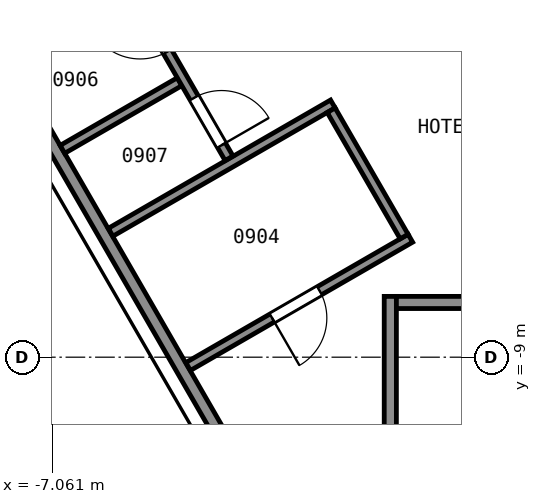
"""IFC4 building model, lengths in metres.
Left out: names, types, materials, properties, quantities, classifications, styles, units other than length and angle.
Written with IfcOpenShell. Run it as: python <this file> out.ifc"""

import sys

from ifc_helpers import new_model, si_unit, direction, frame, frame_2d, origin, place, context, subcontext, project, spatial, rectangle, extrude, element, fill, save


model = new_model("IFC4")
c1 = context("Model", 3, precision=1e-05, world=origin(), true_north=direction((0.0, 1.0)))
c2 = subcontext(c1, "Body", "Model", "MODEL_VIEW")
j1 = project(units=[si_unit("LENGTHUNIT", "METRE"), si_unit("PLANEANGLEUNIT", "RADIAN")], contexts=[c1])
p1 = place(None, origin())
s1 = spatial("IfcSite", under=j1, at=p1, CompositionType="ELEMENT")
p2 = place(p1, origin())
s2 = spatial("IfcBuilding", under=s1, at=p2, CompositionType="ELEMENT")
p3 = place(p2, frame((0.0, 0.0, 47.6)))
s3 = spatial("IfcBuildingStorey", under=s2, at=p3, CompositionType="ELEMENT", Elevation=47.6)
p4 = place(p3, frame((-1.5, -8.0, 0.0), z_axis=(0.0, 0.0, 1.0), x_axis=(0.0, -1.0, 0.0)))
e1 = element("IfcWall", 1, at=p4, inside=s3, PredefinedType="PARTITIONING", context=c2, shape_type="SweptSolid", body=[
    extrude(rectangle(XDim=12.0, YDim=0.2, at=frame_2d((6.0, 0.0))), origin(), (0.0, 0.0, 1.0), 3.35),
])
p5 = place(p3, frame((-1.4, -8.1, 0.0), z_axis=(0.0, 0.0, 1.0), x_axis=(1.0, 0.0, 0.0)))
e2 = element("IfcWall", 2, at=p5, inside=s3, PredefinedType="PARTITIONING", context=c2, shape_type="SweptSolid", body=[
    extrude(rectangle(XDim=2.8, YDim=0.2, at=frame_2d((1.4, 0.0))), origin(), (0.0, 0.0, 1.0), 3.35),
])
p6 = place(p3, frame((-13.664, 5.946, 0.0), z_axis=(0.0, 0.0, 1.0), x_axis=(0.499994327219, -0.866028678941, 0.0)))
e3 = element("IfcWall", 3, at=p6, inside=s3, PredefinedType="PARTITIONING", context=c2, shape_type="SweptSolid", body=[
    extrude(rectangle(XDim=23.968, YDim=0.2, at=frame_2d((11.984, 0.0))), origin(), (0.0, 0.0, 1.0), 3.35),
])
p7 = place(p3, frame((-7.856, -3.912, 0.0), z_axis=(0.0, 0.0, 1.0), x_axis=(0.865971748, 0.500092923031, 0.0)))
e4 = element("IfcWall", 4, at=p7, inside=s3, PredefinedType="PARTITIONING", context=c2, shape_type="SweptSolid", body=[
    extrude(rectangle(XDim=2.225, YDim=0.15, at=frame_2d((1.112, 0.0))), origin(), (0.0, 0.0, 1.0), 3.35),
])
p8 = place(p3, frame((-6.892, -5.582, 0.0), z_axis=(0.0, 0.0, 1.0), x_axis=(0.865944298464, 0.500140452231, 0.0)))
e5 = element("IfcWall", 5, at=p8, inside=s3, PredefinedType="PARTITIONING", context=c2, shape_type="SweptSolid", body=[
    extrude(rectangle(XDim=2.224, YDim=0.15, at=frame_2d((1.112, 0.0))), origin(), (0.0, 0.0, 1.0), 3.35),
])
p9 = place(p3, frame((-6.1, -6.946, 0.0), z_axis=(0.0, 0.0, 1.0), x_axis=(0.866038200431, 0.499977834903, 0.0)))
e6 = element("IfcWall", 6, at=p9, inside=s3, PredefinedType="PARTITIONING", context=c2, shape_type="SweptSolid", body=[
    extrude(rectangle(XDim=4.22, YDim=0.15, at=frame_2d((2.11, 0.0))), origin(), (0.0, 0.0, 1.0), 3.35),
])
p10 = place(p3, frame((-4.152, -5.729, 0.0), z_axis=(0.0, 0.0, 1.0), x_axis=(-0.500024287448, 0.866011380966, 0.0)))
e7 = element("IfcWall", 7, at=p10, inside=s3, PredefinedType="PARTITIONING", context=c2, shape_type="SweptSolid", body=[
    extrude(rectangle(XDim=3.501, YDim=0.15, at=frame_2d((1.75, 0.0))), origin(), (0.0, 0.0, 1.0), 3.35),
])
p11 = place(p10, frame((2.026, 0.0, 0.0)))
e8 = element("IfcOpeningElement", 8, at=p11, cuts=e7, PredefinedType="OPENING", context=c2, shape_type="SweptSolid", body=[
    extrude(rectangle(XDim=0.9, YDim=2.1, at=frame_2d((0.45, 1.05))), frame((0.0, 0.085, 0.0), z_axis=(0.0, -1.0, 0.0), x_axis=(1.0, 0.0, 0.0)), (0.0, 0.0, 1.0), 0.17),
])
p12 = place(p10, frame((0.248, 0.0, 0.0)))
e9 = element("IfcOpeningElement", 9, at=p12, cuts=e7, PredefinedType="OPENING", context=c2, shape_type="SweptSolid", body=[
    extrude(rectangle(XDim=0.9, YDim=2.1, at=frame_2d((0.45, 1.05))), frame((0.0, 0.085, 0.0), z_axis=(0.0, -1.0, 0.0), x_axis=(1.0, 0.0, 0.0)), (0.0, 0.0, 1.0), 0.17),
])
p13 = place(p3, frame((-4.825, -9.154, 0.0), z_axis=(0.0, 0.0, 1.0), x_axis=(0.866023738697, 0.500002884005, 0.0)))
e10 = element("IfcWall", 10, at=p13, inside=s3, PredefinedType="PARTITIONING", context=c2, shape_type="SweptSolid", body=[
    extrude(rectangle(XDim=4.22, YDim=0.15, at=frame_2d((2.11, 0.0))), origin(), (0.0, 0.0, 1.0), 3.35),
])
p14 = place(p13, frame((1.595, 0.0, 0.0)))
e11 = element("IfcOpeningElement", 11, at=p14, cuts=e10, PredefinedType="OPENING", context=c2, shape_type="SweptSolid", body=[
    extrude(rectangle(XDim=0.9, YDim=2.1, at=frame_2d((0.45, 1.05))), frame((0.0, 0.085, 0.0), z_axis=(0.0, -1.0, 0.0), x_axis=(1.0, 0.0, 0.0)), (0.0, 0.0, 1.0), 0.17),
])
p15 = place(p3, frame((-2.472, -4.938, 0.0), z_axis=(0.0, 0.0, 1.0), x_axis=(0.500045362686, -0.865999212041, 0.0)))
e12 = element("IfcWall", 12, at=p15, inside=s3, PredefinedType="PARTITIONING", context=c2, shape_type="SweptSolid", body=[
    extrude(rectangle(XDim=2.4, YDim=0.15, at=frame_2d((1.2, 0.0))), origin(), (0.0, 0.0, 1.0), 3.35),
])
p16 = place(p3, frame((-3.766, -17.959, 0.0), z_axis=(0.0, 0.0, 1.0), x_axis=(-0.500002884005, 0.866023738697, 0.0)))
e13 = element("IfcWall", 13, at=p16, inside=s3, PredefinedType="PARTITIONING", context=c2, shape_type="SweptSolid", body=[
    extrude(rectangle(XDim=28.135, YDim=0.125, at=frame_2d((14.067, 0.0))), origin(), (0.0, 0.0, 1.0), 2.613),
])
p17 = place(p16, frame((25.422, 0.0, 0.0)))
e14 = element("IfcOpeningElement", 14, at=p17, cuts=e13, PredefinedType="OPENING", context=c2, shape_type="SweptSolid", body=[
    extrude(rectangle(XDim=1.0, YDim=2.1, at=frame_2d((0.5, 1.05))), frame((0.0, 0.073, 0.0), z_axis=(0.0, -1.0, 0.0), x_axis=(1.0, 0.0, 0.0)), (0.0, 0.0, 1.0), 0.145),
])
p18 = place(p16, frame((21.693, 0.0, 0.0)))
e15 = element("IfcOpeningElement", 15, at=p18, cuts=e13, PredefinedType="OPENING", context=c2, shape_type="SweptSolid", body=[
    extrude(rectangle(XDim=0.9, YDim=2.1, at=frame_2d((0.45, 1.05))), frame((0.0, 0.073, 0.0), z_axis=(0.0, -1.0, 0.0), x_axis=(1.0, 0.0, 0.0)), (0.0, 0.0, 1.0), 0.145),
])
p19 = place(p16, frame((14.438, 0.0, 0.0)))
e16 = element("IfcOpeningElement", 16, at=p19, cuts=e13, PredefinedType="OPENING", context=c2, shape_type="SweptSolid", body=[
    extrude(rectangle(XDim=0.9, YDim=2.1, at=frame_2d((0.45, 1.05))), frame((0.0, 0.073, 0.0), z_axis=(0.0, -1.0, 0.0), x_axis=(1.0, 0.0, 0.0)), (0.0, 0.0, 1.0), 0.145),
])
p20 = place(p16, frame((11.712, 0.0, 0.0)))
e17 = element("IfcOpeningElement", 17, at=p20, cuts=e13, PredefinedType="OPENING", context=c2, shape_type="SweptSolid", body=[
    extrude(rectangle(XDim=0.9, YDim=2.1, at=frame_2d((0.45, 1.05))), frame((0.0, 0.073, 0.0), z_axis=(0.0, -1.0, 0.0), x_axis=(1.0, 0.0, 0.0)), (0.0, 0.0, 1.0), 0.145),
])
p21 = place(p16, frame((4.787, 0.0, 0.0)))
e18 = element("IfcOpeningElement", 18, at=p21, cuts=e13, PredefinedType="OPENING", context=c2, shape_type="SweptSolid", body=[
    extrude(rectangle(XDim=0.9, YDim=2.1, at=frame_2d((0.45, 1.05))), frame((0.0, 0.073, 0.0), z_axis=(0.0, -1.0, 0.0), x_axis=(1.0, 0.0, 0.0)), (0.0, 0.0, 1.0), 0.145),
])
p22 = place(p16, frame((1.762, 0.0, 0.0)))
e19 = element("IfcOpeningElement", 19, at=p22, cuts=e13, PredefinedType="OPENING", context=c2, shape_type="SweptSolid", body=[
    extrude(rectangle(XDim=0.9, YDim=2.1, at=frame_2d((0.45, 1.05))), frame((0.0, 0.073, 0.0), z_axis=(0.0, -1.0, 0.0), x_axis=(1.0, 0.0, 0.0)), (0.0, 0.0, 1.0), 0.145),
])
p23 = place(p11, origin())
e20 = element("IfcDoor", 20, at=p23, inside=s3, OperationType="SINGLE_SWING_RIGHT", PredefinedType="DOOR", context=c2, shape_type="SweptSolid", body=[
    extrude(rectangle(XDim=0.9, YDim=2.1, at=frame_2d((0.45, 1.05))), frame((0.0, 0.025, 0.0), z_axis=(0.0, -1.0, 0.0), x_axis=(1.0, 0.0, 0.0)), (0.0, 0.0, 1.0), 0.05),
])
fill(e8, e20)
p24 = place(p12, origin())
e21 = element("IfcDoor", 21, at=p24, inside=s3, OperationType="SINGLE_SWING_LEFT", PredefinedType="DOOR", context=c2, shape_type="SweptSolid", body=[
    extrude(rectangle(XDim=0.9, YDim=2.1, at=frame_2d((0.45, 1.05))), frame((0.0, 0.025, 0.0), z_axis=(0.0, -1.0, 0.0), x_axis=(1.0, 0.0, 0.0)), (0.0, 0.0, 1.0), 0.05),
])
fill(e9, e21)
p25 = place(p14, origin())
e22 = element("IfcDoor", 22, at=p25, inside=s3, OperationType="SINGLE_SWING_LEFT", PredefinedType="DOOR", context=c2, shape_type="SweptSolid", body=[
    extrude(rectangle(XDim=0.9, YDim=2.1, at=frame_2d((0.45, 1.05))), frame((0.0, 0.025, 0.0), z_axis=(0.0, -1.0, 0.0), x_axis=(1.0, 0.0, 0.0)), (0.0, 0.0, 1.0), 0.05),
])
fill(e11, e22)
save(model, sys.argv[1])
